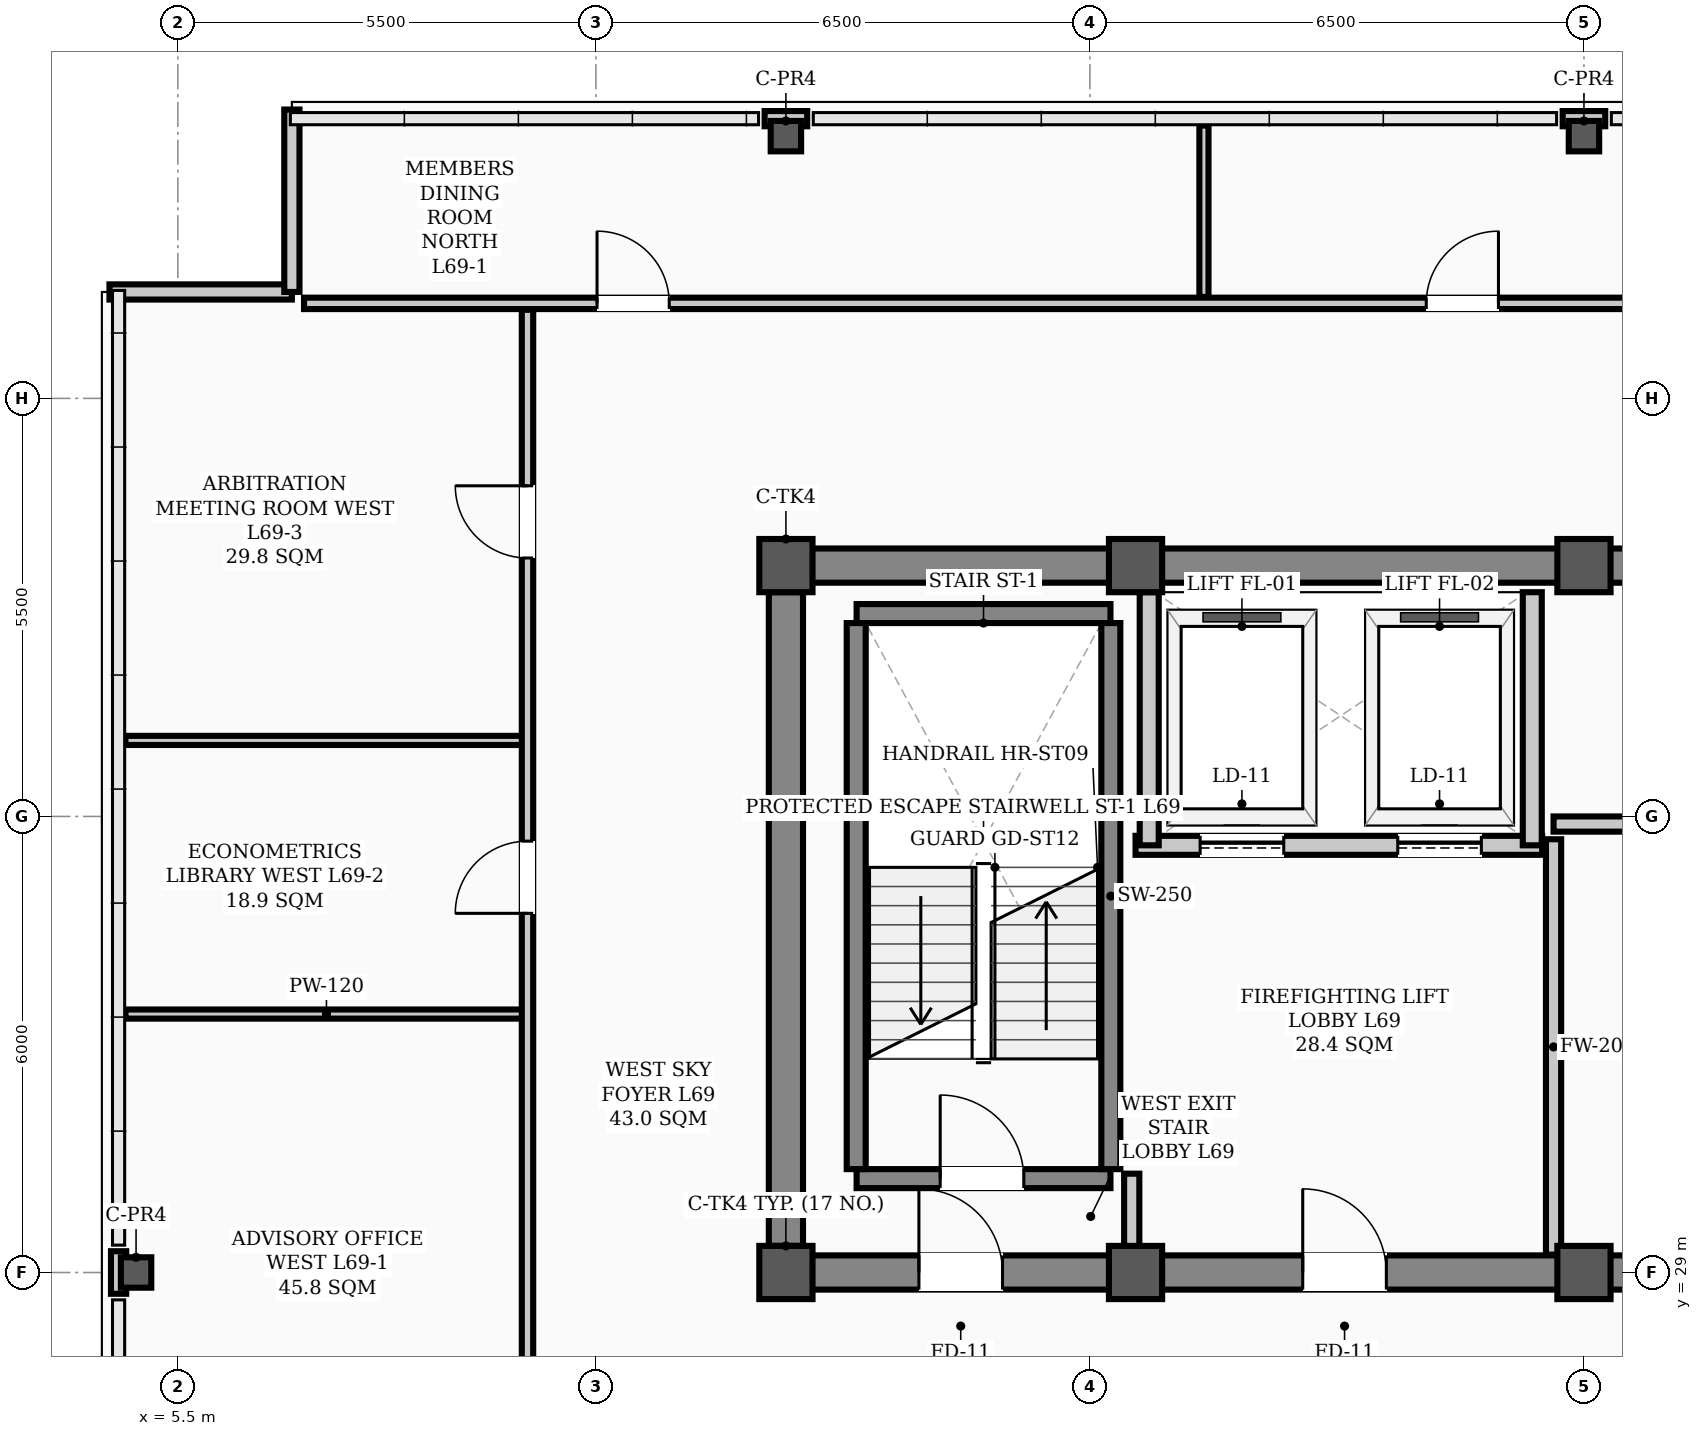
"""IFC4 building model, lengths in metres.
Left out: names, types, materials, properties, quantities, classifications, styles, units other than length and angle.
Written with IfcOpenShell. Run it as: python <this file> out.ifc"""

import sys

from ifc_helpers import new_model, si_unit, direction, frame, frame_2d, origin, origin_2d, place, context, subcontext, project, spatial, rectangle, hollow_rectangle, extrude, element, fill, save


model = new_model("IFC4")
c1 = context("Model", 3, precision=1e-05, world=origin(), true_north=direction((0.0, 1.0)))
c2 = subcontext(c1, "Body", "Model", "MODEL_VIEW")
j1 = project(units=[si_unit("LENGTHUNIT", "METRE"), si_unit("PLANEANGLEUNIT", "RADIAN")], contexts=[c1])
p1 = place(None, origin())
s1 = spatial("IfcSite", under=j1, at=p1, CompositionType="ELEMENT")
p2 = place(p1, origin())
s2 = spatial("IfcBuilding", under=s1, at=p2, CompositionType="ELEMENT")
p3 = place(p2, frame((0.0, 0.0, 277.4)))
s3 = spatial("IfcBuildingStorey", under=s2, at=p3, CompositionType="ELEMENT", Elevation=277.4)
for number, where, z_axis, x_axis in (
    (1, (13.5, 29.0, 0.0), (0.0, 0.0, 1.0), (1.0, 0.0, 0.0)),
    (2, (13.5, 38.3, 0.0), (0.0, 0.0, 1.0), (1.0, 0.0, 0.0)),
    (3, (18.1, 29.0, 0.0), (0.0, 0.0, 1.0), (1.0, 0.0, 0.0)),
    (4, (18.1, 38.3, 0.0), (0.0, 0.0, 1.0), (1.0, 0.0, 0.0)),
    (5, (24.0, 29.0, 0.0), (0.0, 0.0, 1.0), (1.0, 0.0, 0.0)),
    (6, (24.0, 38.3, 0.0), (0.0, 0.0, 1.0), (1.0, 0.0, 0.0)),
):
    element("IfcColumn", number, at=place(p3, frame(where, z_axis=z_axis, x_axis=x_axis)), inside=s3, PredefinedType="COLUMN", context=c2, shape_type="SweptSolid", body=[
        extrude(hollow_rectangle(XDim=0.7, YDim=0.7, WallThickness=0.028, InnerFilletRadius=0.014, OuterFilletRadius=0.042, at=origin_2d()), origin(), (0.0, 0.0, 1.0), 3.9),
    ])
for number, where, z_axis, x_axis in (
    (7, (4.95, 29.0, 0.0), (0.0, 0.0, 1.0), (1.0, 0.0, 0.0)),
    (8, (13.5, 43.95, 0.0), (0.0, 0.0, 1.0), (1.0, 0.0, 0.0)),
    (9, (24.0, 43.95, 0.0), (0.0, 0.0, 1.0), (1.0, 0.0, 0.0)),
):
    element("IfcColumn", number, at=place(p3, frame(where, z_axis=z_axis, x_axis=x_axis)), inside=s3, PredefinedType="COLUMN", context=c2, shape_type="SweptSolid", body=[
        extrude(hollow_rectangle(XDim=0.4, YDim=0.4, WallThickness=0.02, InnerFilletRadius=0.02, OuterFilletRadius=0.04, at=origin_2d()), origin(), (0.0, 0.0, 1.0), 3.66),
    ])
for number, where, z_axis, x_axis in (
    (10, (13.22, 44.18, 0.0), (0.0, 0.0, 1.0), (1.0, 0.0, 0.0)),
    (11, (23.72, 44.18, 0.0), (0.0, 0.0, 1.0), (1.0, 0.0, 0.0)),
    (12, (4.72, 28.72, 0.0), (0.0, 0.0, 1.0), (0.0, 1.0, 0.0)),
):
    element("IfcWall", number, at=place(p3, frame(where, z_axis=z_axis, x_axis=x_axis)), inside=s3, PredefinedType="PARAPET", context=c2, shape_type="SweptSolid", body=[
        extrude(rectangle(XDim=0.56, YDim=0.2, at=frame_2d((0.28, 0.0))), origin(), (0.0, 0.0, 1.0), 1.2),
    ])
p4 = place(p3, frame((4.6, 41.9, 0.0), z_axis=(0.0, 0.0, 1.0), x_axis=(1.0, 0.0, 0.0)))
e13 = element("IfcWall", 13, at=p4, inside=s3, PredefinedType="PARAPET", context=c2, shape_type="SweptSolid", body=[
    extrude(rectangle(XDim=2.4, YDim=0.2, at=frame_2d((1.2, 0.0))), origin(), (0.0, 0.0, 1.0), 1.2),
])
p5 = place(p3, frame((7.0, 41.9, 0.0), z_axis=(0.0, 0.0, 1.0), x_axis=(0.0, 1.0, 0.0)))
e14 = element("IfcWall", 14, at=p5, inside=s3, PredefinedType="PARAPET", context=c2, shape_type="SweptSolid", body=[
    extrude(rectangle(XDim=2.4, YDim=0.2, at=frame_2d((1.2, 0.0))), origin(), (0.0, 0.0, 1.0), 1.2),
])
p6 = place(p3, frame((13.5, 29.0, 0.0), z_axis=(0.0, 0.0, 1.0), x_axis=(1.0, 0.0, 0.0)))
e15 = element("IfcWall", 15, at=p6, inside=s3, PredefinedType="SHEAR", context=c2, shape_type="SweptSolid", body=[
    extrude(rectangle(XDim=30.5, YDim=0.45, at=frame_2d((15.25, 0.0))), origin(), (0.0, 0.0, 1.0), 3.66),
])
p7 = place(p6, frame((1.75, 0.0, 0.0)))
e16 = element("IfcOpeningElement", 16, at=p7, cuts=e15, PredefinedType="OPENING", context=c2, shape_type="SweptSolid", body=[
    extrude(rectangle(XDim=1.1, YDim=2.08, at=frame_2d((0.55, 1.04))), frame((0.0, 0.235, 0.0), z_axis=(0.0, -1.0, 0.0), x_axis=(1.0, 0.0, 0.0)), (0.0, 0.0, 1.0), 0.47),
])
p8 = place(p6, frame((26.7, 0.0, 0.0)))
e17 = element("IfcOpeningElement", 17, at=p8, cuts=e15, PredefinedType="OPENING", context=c2, shape_type="SweptSolid", body=[
    extrude(rectangle(XDim=1.1, YDim=2.08, at=frame_2d((0.55, 1.04))), frame((0.0, 0.235, 0.0), z_axis=(0.0, -1.0, 0.0), x_axis=(1.0, 0.0, 0.0)), (0.0, 0.0, 1.0), 0.47),
])
p9 = place(p6, frame((6.8, 0.0, 0.0)))
e18 = element("IfcOpeningElement", 18, at=p9, cuts=e15, PredefinedType="OPENING", context=c2, shape_type="SweptSolid", body=[
    extrude(rectangle(XDim=1.1, YDim=2.08, at=frame_2d((0.55, 1.04))), frame((0.0, 0.235, 0.0), z_axis=(0.0, -1.0, 0.0), x_axis=(1.0, 0.0, 0.0)), (0.0, 0.0, 1.0), 0.47),
])
p10 = place(p6, frame((13.2, 0.0, 0.0)))
e19 = element("IfcOpeningElement", 19, at=p10, cuts=e15, PredefinedType="OPENING", context=c2, shape_type="SweptSolid", body=[
    extrude(rectangle(XDim=1.6, YDim=2.08, at=frame_2d((0.8, 1.04))), frame((0.0, 0.235, 0.0), z_axis=(0.0, -1.0, 0.0), x_axis=(1.0, 0.0, 0.0)), (0.0, 0.0, 1.0), 0.47),
])
p11 = place(p6, frame((19.5, 0.0, 0.0)))
e20 = element("IfcOpeningElement", 20, at=p11, cuts=e15, PredefinedType="OPENING", context=c2, shape_type="SweptSolid", body=[
    extrude(rectangle(XDim=0.9, YDim=2.08, at=frame_2d((0.45, 1.04))), frame((0.0, 0.235, 0.0), z_axis=(0.0, -1.0, 0.0), x_axis=(1.0, 0.0, 0.0)), (0.0, 0.0, 1.0), 0.47),
])
p12 = place(p6, frame((21.55, 0.0, 0.0)))
e21 = element("IfcOpeningElement", 21, at=p12, cuts=e15, PredefinedType="OPENING", context=c2, shape_type="SweptSolid", body=[
    extrude(rectangle(XDim=0.9, YDim=2.08, at=frame_2d((0.45, 1.04))), frame((0.0, 0.235, 0.0), z_axis=(0.0, -1.0, 0.0), x_axis=(1.0, 0.0, 0.0)), (0.0, 0.0, 1.0), 0.47),
])
p13 = place(p3, frame((13.5, 38.3, 0.0), z_axis=(0.0, 0.0, 1.0), x_axis=(1.0, 0.0, 0.0)))
e22 = element("IfcWall", 22, at=p13, inside=s3, PredefinedType="SHEAR", context=c2, shape_type="SweptSolid", body=[
    extrude(rectangle(XDim=30.5, YDim=0.45, at=frame_2d((15.25, 0.0))), origin(), (0.0, 0.0, 1.0), 3.66),
])
p14 = place(p3, frame((13.5, 29.35, 0.0), z_axis=(0.0, 0.0, 1.0), x_axis=(0.0, 1.0, 0.0)))
e23 = element("IfcWall", 23, at=p14, inside=s3, PredefinedType="SHEAR", context=c2, shape_type="SweptSolid", body=[
    extrude(rectangle(XDim=8.6, YDim=0.45, at=frame_2d((4.3, 0.0))), origin(), (0.0, 0.0, 1.0), 3.66),
])
p15 = place(p3, frame((14.43, 30.235, 0.0), z_axis=(0.0, 0.0, 1.0), x_axis=(1.0, 0.0, 0.0)))
e24 = element("IfcWall", 24, at=p15, inside=s3, PredefinedType="STANDARD", context=c2, shape_type="SweptSolid", body=[
    extrude(rectangle(XDim=3.34, YDim=0.25, at=frame_2d((1.67, 0.0))), origin(), (0.0, 0.0, 1.0), 3.66),
])
p16 = place(p15, frame((1.1, 0.0, 0.0)))
e25 = element("IfcOpeningElement", 25, at=p16, cuts=e24, PredefinedType="OPENING", context=c2, shape_type="SweptSolid", body=[
    extrude(rectangle(XDim=1.1, YDim=2.08, at=frame_2d((0.55, 1.04))), frame((0.0, 0.135, 0.0), z_axis=(0.0, -1.0, 0.0), x_axis=(1.0, 0.0, 0.0)), (0.0, 0.0, 1.0), 0.27),
])
p17 = place(p3, frame((14.43, 37.669, 0.0), z_axis=(0.0, 0.0, 1.0), x_axis=(1.0, 0.0, 0.0)))
e26 = element("IfcWall", 26, at=p17, inside=s3, PredefinedType="STANDARD", context=c2, shape_type="SweptSolid", body=[
    extrude(rectangle(XDim=3.34, YDim=0.25, at=frame_2d((1.67, 0.0))), origin(), (0.0, 0.0, 1.0), 3.66),
])
for number, where, z_axis, x_axis in (
    (27, (14.425, 30.36, 0.0), (0.0, 0.0, 1.0), (0.0, 1.0, 0.0)),
    (28, (17.775, 30.36, 0.0), (0.0, 0.0, 1.0), (0.0, 1.0, 0.0)),
):
    element("IfcWall", number, at=place(p3, frame(where, z_axis=z_axis, x_axis=x_axis)), inside=s3, PredefinedType="STANDARD", context=c2, shape_type="SweptSolid", body=[
        extrude(rectangle(XDim=7.184, YDim=0.25, at=frame_2d((3.592, 0.0))), origin(), (0.0, 0.0, 1.0), 3.66),
    ])
p18 = place(p3, frame((18.1, 34.62, 0.0), z_axis=(0.0, 0.0, 1.0), x_axis=(1.0, 0.0, 0.0)))
e29 = element("IfcWall", 29, at=p18, inside=s3, PredefinedType="STANDARD", context=c2, shape_type="SweptSolid", body=[
    extrude(rectangle(XDim=5.35, YDim=0.25, at=frame_2d((2.675, 0.0))), origin(), (0.0, 0.0, 1.0), 3.66),
])
p19 = place(p18, frame((0.85, 0.0, 0.0)))
e30 = element("IfcOpeningElement", 30, at=p19, cuts=e29, PredefinedType="OPENING", context=c2, shape_type="SweptSolid", body=[
    extrude(rectangle(XDim=1.1, YDim=2.08, at=frame_2d((0.55, 1.04))), frame((0.0, 0.135, 0.0), z_axis=(0.0, -1.0, 0.0), x_axis=(1.0, 0.0, 0.0)), (0.0, 0.0, 1.0), 0.27),
])
p20 = place(p18, frame((3.45, 0.0, 0.0)))
e31 = element("IfcOpeningElement", 31, at=p20, cuts=e29, PredefinedType="OPENING", context=c2, shape_type="SweptSolid", body=[
    extrude(rectangle(XDim=1.1, YDim=2.08, at=frame_2d((0.55, 1.04))), frame((0.0, 0.135, 0.0), z_axis=(0.0, -1.0, 0.0), x_axis=(1.0, 0.0, 0.0)), (0.0, 0.0, 1.0), 0.27),
])
for number, where, z_axis, x_axis in (
    (32, (18.28, 34.62, 0.0), (0.0, 0.0, 1.0), (0.0, 1.0, 0.0)),
    (33, (23.32, 34.62, 0.0), (0.0, 0.0, 1.0), (0.0, 1.0, 0.0)),
):
    element("IfcWall", number, at=place(p3, frame(where, z_axis=z_axis, x_axis=x_axis)), inside=s3, PredefinedType="STANDARD", context=c2, shape_type="SweptSolid", body=[
        extrude(rectangle(XDim=3.33, YDim=0.25, at=frame_2d((1.665, 0.0))), origin(), (0.0, 0.0, 1.0), 3.66),
    ])
p21 = place(p3, frame((23.6, 34.9, 0.0), z_axis=(0.0, 0.0, 1.0), x_axis=(1.0, 0.0, 0.0)))
e34 = element("IfcWall", 34, at=p21, inside=s3, PredefinedType="STANDARD", context=c2, shape_type="SweptSolid", body=[
    extrude(rectangle(XDim=8.18, YDim=0.2, at=frame_2d((4.09, 0.0))), origin(), (0.0, 0.0, 1.0), 3.66),
])
p22 = place(p21, frame((3.45, 0.0, 0.0)))
e35 = element("IfcOpeningElement", 35, at=p22, cuts=e34, PredefinedType="OPENING", context=c2, shape_type="SweptSolid", body=[
    extrude(rectangle(XDim=1.1, YDim=2.08, at=frame_2d((0.55, 1.04))), frame((0.0, 0.11, 0.0), z_axis=(0.0, -1.0, 0.0), x_axis=(1.0, 0.0, 0.0)), (0.0, 0.0, 1.0), 0.22),
])
for number, where, z_axis, x_axis in (
    (36, (4.81, 32.4, 0.0), (0.0, 0.0, 1.0), (1.0, 0.0, 0.0)),
    (37, (4.81, 36.0, 0.0), (0.0, 0.0, 1.0), (1.0, 0.0, 0.0)),
):
    element("IfcWall", number, at=place(p3, frame(where, z_axis=z_axis, x_axis=x_axis)), inside=s3, PredefinedType="PARTITIONING", context=c2, shape_type="SweptSolid", body=[
        extrude(rectangle(XDim=5.29, YDim=0.12, at=frame_2d((2.645, 0.0))), origin(), (0.0, 0.0, 1.0), 3.66),
    ])
p23 = place(p3, frame((7.16, 41.75, 0.0), z_axis=(0.0, 0.0, 1.0), x_axis=(1.0, 0.0, 0.0)))
e38 = element("IfcWall", 38, at=p23, inside=s3, PredefinedType="PARTITIONING", context=c2, shape_type="SweptSolid", body=[
    extrude(rectangle(XDim=36.18, YDim=0.15, at=frame_2d((18.09, 0.0))), origin(), (0.0, 0.0, 1.0), 2.24),
])
p24 = place(p23, frame((3.855, 0.0, 0.0)))
e39 = element("IfcOpeningElement", 39, at=p24, cuts=e38, PredefinedType="OPENING", context=c2, shape_type="SweptSolid", body=[
    extrude(rectangle(XDim=0.95, YDim=2.08, at=frame_2d((0.475, 1.04))), frame((0.0, 0.085, 0.0), z_axis=(0.0, -1.0, 0.0), x_axis=(1.0, 0.0, 0.0)), (0.0, 0.0, 1.0), 0.17),
])
p25 = place(p23, frame((14.765, 0.0, 0.0)))
e40 = element("IfcOpeningElement", 40, at=p25, cuts=e38, PredefinedType="OPENING", context=c2, shape_type="SweptSolid", body=[
    extrude(rectangle(XDim=0.95, YDim=2.08, at=frame_2d((0.475, 1.04))), frame((0.0, 0.085, 0.0), z_axis=(0.0, -1.0, 0.0), x_axis=(1.0, 0.0, 0.0)), (0.0, 0.0, 1.0), 0.17),
])
p26 = place(p23, frame((25.165, 0.0, 0.0)))
e41 = element("IfcOpeningElement", 41, at=p26, cuts=e38, PredefinedType="OPENING", context=c2, shape_type="SweptSolid", body=[
    extrude(rectangle(XDim=0.95, YDim=2.08, at=frame_2d((0.475, 1.04))), frame((0.0, 0.085, 0.0), z_axis=(0.0, -1.0, 0.0), x_axis=(1.0, 0.0, 0.0)), (0.0, 0.0, 1.0), 0.17),
])
p27 = place(p23, frame((32.465, 0.0, 0.0)))
e42 = element("IfcOpeningElement", 42, at=p27, cuts=e38, PredefinedType="OPENING", context=c2, shape_type="SweptSolid", body=[
    extrude(rectangle(XDim=0.95, YDim=2.08, at=frame_2d((0.475, 1.04))), frame((0.0, 0.085, 0.0), z_axis=(0.0, -1.0, 0.0), x_axis=(1.0, 0.0, 0.0)), (0.0, 0.0, 1.0), 0.17),
])
p28 = place(p3, frame((18.05, 29.235, 0.0), z_axis=(0.0, 0.0, 1.0), x_axis=(0.0, 1.0, 0.0)))
e43 = element("IfcWall", 43, at=p28, inside=s3, PredefinedType="STANDARD", context=c2, shape_type="SweptSolid", body=[
    extrude(rectangle(XDim=1.065, YDim=0.2, at=frame_2d((0.532, 0.0))), origin(), (0.0, 0.0, 1.0), 2.24),
])
p29 = place(p3, frame((23.6, 29.235, 0.0), z_axis=(0.0, 0.0, 1.0), x_axis=(0.0, 1.0, 0.0)))
e44 = element("IfcWall", 44, at=p29, inside=s3, PredefinedType="STANDARD", context=c2, shape_type="SweptSolid", body=[
    extrude(rectangle(XDim=5.465, YDim=0.2, at=frame_2d((2.732, 0.0))), origin(), (0.0, 0.0, 1.0), 2.24),
])
p30 = place(p3, frame((10.1, 23.785, 0.0), z_axis=(0.0, 0.0, 1.0), x_axis=(0.0, 1.0, 0.0)))
e45 = element("IfcWall", 45, at=p30, inside=s3, PredefinedType="PARTITIONING", context=c2, shape_type="SweptSolid", body=[
    extrude(rectangle(XDim=17.88, YDim=0.15, at=frame_2d((8.94, 0.0))), origin(), (0.0, 0.0, 1.0), 2.24),
])
p31 = place(p30, frame((0.64, 0.0, 0.0)))
e46 = element("IfcOpeningElement", 46, at=p31, cuts=e45, PredefinedType="OPENING", context=c2, shape_type="SweptSolid", body=[
    extrude(rectangle(XDim=0.95, YDim=2.08, at=frame_2d((0.475, 1.04))), frame((0.0, 0.085, 0.0), z_axis=(0.0, -1.0, 0.0), x_axis=(1.0, 0.0, 0.0)), (0.0, 0.0, 1.0), 0.17),
])
p32 = place(p30, frame((9.94, 0.0, 0.0)))
e47 = element("IfcOpeningElement", 47, at=p32, cuts=e45, PredefinedType="OPENING", context=c2, shape_type="SweptSolid", body=[
    extrude(rectangle(XDim=0.95, YDim=2.08, at=frame_2d((0.475, 1.04))), frame((0.0, 0.085, 0.0), z_axis=(0.0, -1.0, 0.0), x_axis=(1.0, 0.0, 0.0)), (0.0, 0.0, 1.0), 0.17),
])
p33 = place(p30, frame((14.615, 0.0, 0.0)))
e48 = element("IfcOpeningElement", 48, at=p33, cuts=e45, PredefinedType="OPENING", context=c2, shape_type="SweptSolid", body=[
    extrude(rectangle(XDim=0.95, YDim=2.08, at=frame_2d((0.475, 1.04))), frame((0.0, 0.085, 0.0), z_axis=(0.0, -1.0, 0.0), x_axis=(1.0, 0.0, 0.0)), (0.0, 0.0, 1.0), 0.17),
])
p34 = place(p3, frame((19.0, 41.835, 0.0), z_axis=(0.0, 0.0, 1.0), x_axis=(0.0, 1.0, 0.0)))
e49 = element("IfcWall", 49, at=p34, inside=s3, PredefinedType="PARTITIONING", context=c2, shape_type="SweptSolid", body=[
    extrude(rectangle(XDim=2.255, YDim=0.12, at=frame_2d((1.127, 0.0))), origin(), (0.0, 0.0, 1.0), 3.66),
])
p35 = place(p16, origin())
e50 = element("IfcDoor", 50, at=p35, inside=s3, OperationType="SINGLE_SWING_LEFT", PredefinedType="DOOR", context=c2, shape_type="SweptSolid", body=[
    extrude(rectangle(XDim=1.1, YDim=2.08, at=frame_2d((0.55, 1.04))), frame((0.0, 0.025, 0.0), z_axis=(0.0, -1.0, 0.0), x_axis=(1.0, 0.0, 0.0)), (0.0, 0.0, 1.0), 0.05),
])
fill(e25, e50)
p36 = place(p7, origin())
e51 = element("IfcDoor", 51, at=p36, inside=s3, OperationType="SINGLE_SWING_LEFT", PredefinedType="DOOR", context=c2, shape_type="SweptSolid", body=[
    extrude(rectangle(XDim=1.1, YDim=2.08, at=frame_2d((0.55, 1.04))), frame((0.0, 0.025, 0.0), z_axis=(0.0, -1.0, 0.0), x_axis=(1.0, 0.0, 0.0)), (0.0, 0.0, 1.0), 0.05),
])
fill(e16, e51)
p37 = place(p9, origin())
e52 = element("IfcDoor", 52, at=p37, inside=s3, OperationType="SINGLE_SWING_LEFT", PredefinedType="DOOR", context=c2, shape_type="SweptSolid", body=[
    extrude(rectangle(XDim=1.1, YDim=2.08, at=frame_2d((0.55, 1.04))), frame((0.0, 0.025, 0.0), z_axis=(0.0, -1.0, 0.0), x_axis=(1.0, 0.0, 0.0)), (0.0, 0.0, 1.0), 0.05),
])
fill(e18, e52)
p38 = place(p32, origin())
e53 = element("IfcDoor", 53, at=p38, inside=s3, OperationType="SINGLE_SWING_LEFT", PredefinedType="DOOR", context=c2, shape_type="SweptSolid", body=[
    extrude(rectangle(XDim=0.95, YDim=2.08, at=frame_2d((0.475, 1.04))), frame((0.0, 0.025, 0.0), z_axis=(0.0, -1.0, 0.0), x_axis=(1.0, 0.0, 0.0)), (0.0, 0.0, 1.0), 0.05),
])
fill(e47, e53)
p39 = place(p33, origin())
e54 = element("IfcDoor", 54, at=p39, inside=s3, OperationType="SINGLE_SWING_RIGHT", PredefinedType="DOOR", context=c2, shape_type="SweptSolid", body=[
    extrude(rectangle(XDim=0.95, YDim=2.08, at=frame_2d((0.475, 1.04))), frame((0.0, 0.025, 0.0), z_axis=(0.0, -1.0, 0.0), x_axis=(1.0, 0.0, 0.0)), (0.0, 0.0, 1.0), 0.05),
])
fill(e48, e54)
p40 = place(p24, origin())
e55 = element("IfcDoor", 55, at=p40, inside=s3, OperationType="SINGLE_SWING_LEFT", PredefinedType="DOOR", context=c2, shape_type="SweptSolid", body=[
    extrude(rectangle(XDim=0.95, YDim=2.08, at=frame_2d((0.475, 1.04))), frame((0.0, 0.025, 0.0), z_axis=(0.0, -1.0, 0.0), x_axis=(1.0, 0.0, 0.0)), (0.0, 0.0, 1.0), 0.05),
])
fill(e39, e55)
p41 = place(p25, origin())
e56 = element("IfcDoor", 56, at=p41, inside=s3, OperationType="SINGLE_SWING_RIGHT", PredefinedType="DOOR", context=c2, shape_type="SweptSolid", body=[
    extrude(rectangle(XDim=0.95, YDim=2.08, at=frame_2d((0.475, 1.04))), frame((0.0, 0.025, 0.0), z_axis=(0.0, -1.0, 0.0), x_axis=(1.0, 0.0, 0.0)), (0.0, 0.0, 1.0), 0.05),
])
fill(e40, e56)
p42 = place(p19, origin())
e57 = element("IfcDoor", 57, at=p42, inside=s3, OperationType="SLIDING_TO_LEFT", PredefinedType="DOOR", context=c2, shape_type="SweptSolid", body=[
    extrude(rectangle(XDim=1.1, YDim=2.08, at=frame_2d((0.55, 1.04))), frame((0.0, 0.025, 0.0), z_axis=(0.0, -1.0, 0.0), x_axis=(1.0, 0.0, 0.0)), (0.0, 0.0, 1.0), 0.05),
])
fill(e30, e57)
p43 = place(p20, origin())
e58 = element("IfcDoor", 58, at=p43, inside=s3, OperationType="SLIDING_TO_LEFT", PredefinedType="DOOR", context=c2, shape_type="SweptSolid", body=[
    extrude(rectangle(XDim=1.1, YDim=2.08, at=frame_2d((0.55, 1.04))), frame((0.0, 0.025, 0.0), z_axis=(0.0, -1.0, 0.0), x_axis=(1.0, 0.0, 0.0)), (0.0, 0.0, 1.0), 0.05),
])
fill(e31, e58)
save(model, sys.argv[1])
